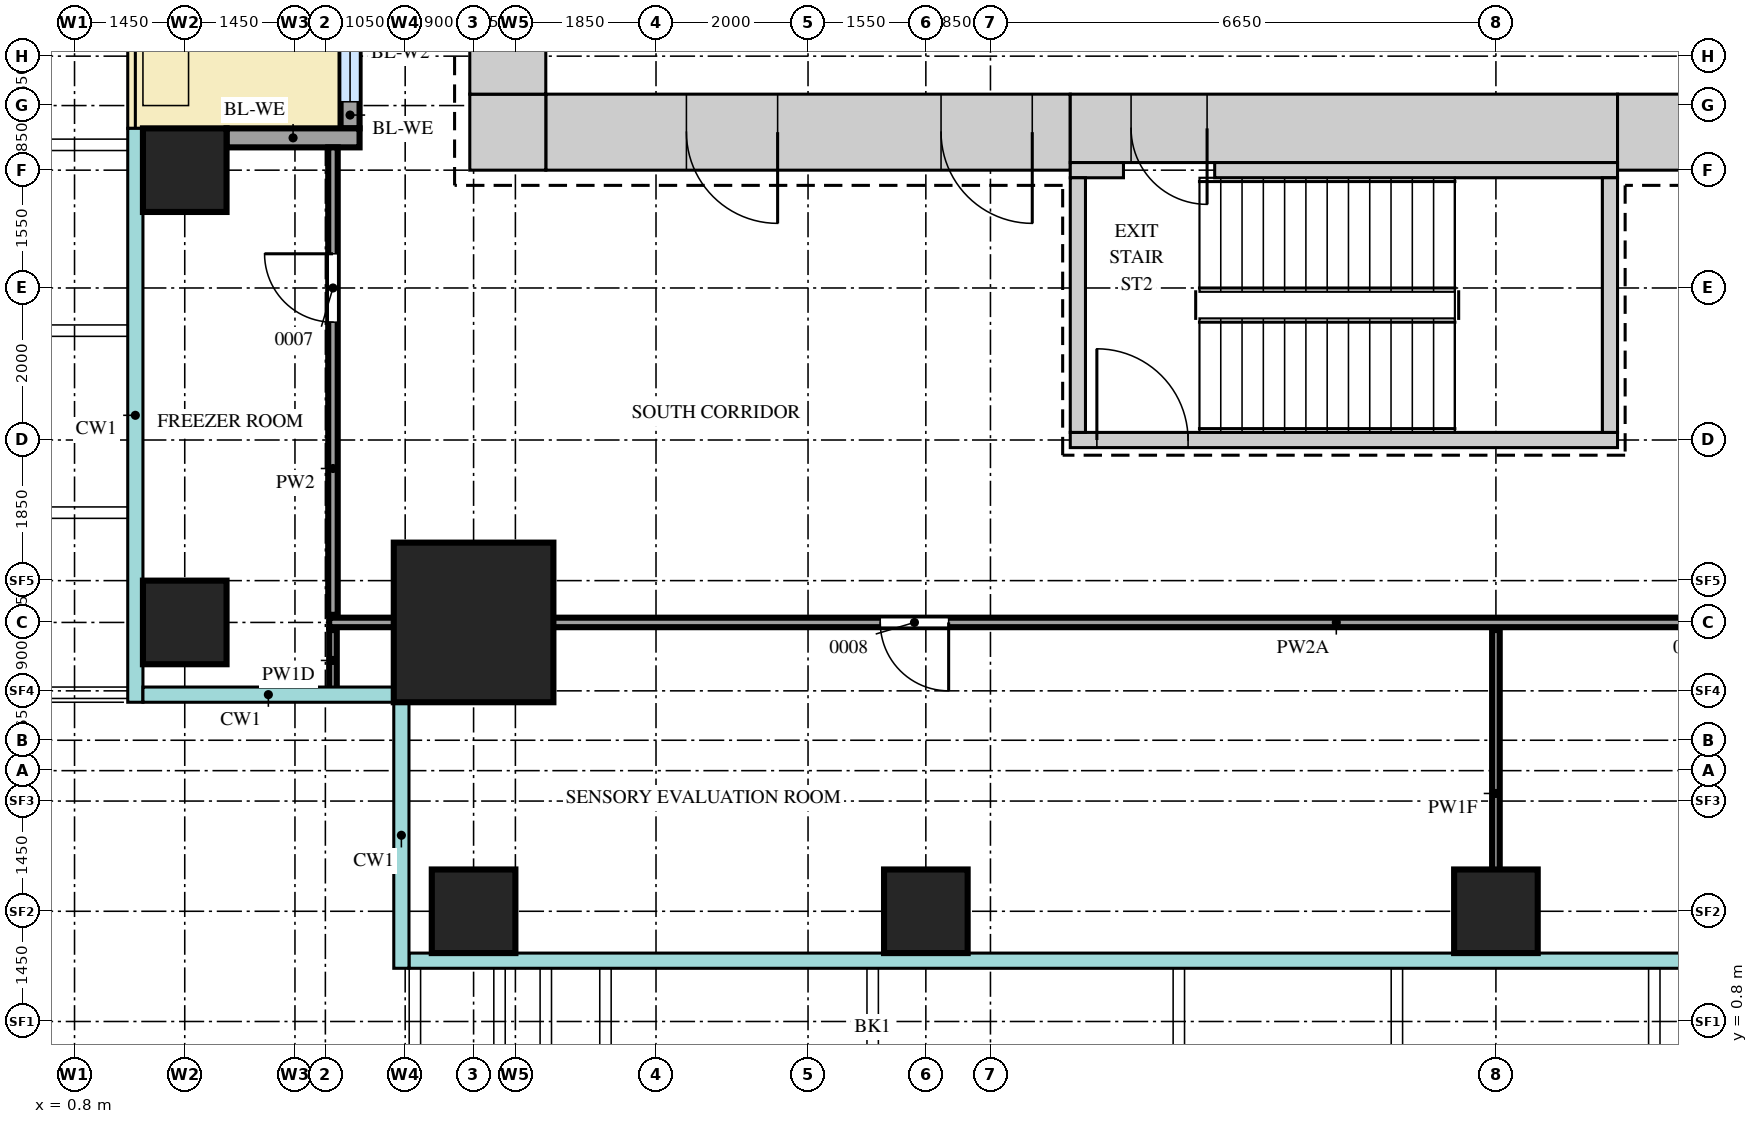
"""IFC4 building model, lengths in metres.
Left out: names, types, materials, properties, quantities, classifications, styles, units other than length and angle.
Written with IfcOpenShell. Run it as: python <this file> out.ifc"""

import sys

from ifc_helpers import new_model, si_unit, direction, frame, frame_2d, origin, origin_2d, place, context, subcontext, project, spatial, rectangle, extrude, source, transform, mapped, element, fill, save


model = new_model("IFC4")
c1 = context("Model", 3, precision=1e-05, world=origin(), true_north=direction((0.0, 1.0)))
c2 = subcontext(c1, "Body", "Model", "MODEL_VIEW")
j1 = project(units=[si_unit("LENGTHUNIT", "METRE"), si_unit("PLANEANGLEUNIT", "RADIAN")], contexts=[c1])
p1 = place(None, origin())
s1 = spatial("IfcSite", under=j1, at=p1, CompositionType="ELEMENT")
p2 = place(p1, origin())
s2 = spatial("IfcBuilding", under=s1, at=p2, CompositionType="ELEMENT")
p3 = place(p2, frame((0.0, 0.0, 114.7)))
s3 = spatial("IfcBuildingStorey", under=s2, at=p3, CompositionType="ELEMENT", Elevation=114.7)
m1 = source(origin(), c2, "Body", "SweptSolid", [
    extrude(rectangle(XDim=6.9, YDim=1.0, at=frame_2d((3.45, 0.0))), origin(), (0.0, 0.0, 1.0), 4.1),
])
p4 = place(p3, frame((7.0, 12.5, 0.0), z_axis=(0.0, 0.0, 1.0), x_axis=(1.0, 0.0, 0.0)))
e1 = element("IfcWall", 1, at=p4, inside=s3, PredefinedType="SHEAR", context=c2, shape_type="MappedRepresentation", body=[
    mapped(m1, transform((0.0, 0.0, 0.0))),
])
m2 = source(origin(), c2, "Body", "SweptSolid", [
    extrude(rectangle(XDim=1.2, YDim=2.1, at=frame_2d((0.6, 1.05))), frame((0.0, 0.51, 0.0), z_axis=(0.0, -1.0, 0.0), x_axis=(1.0, 0.0, 0.0)), (0.0, 0.0, 1.0), 1.02),
])
p5 = place(p4, frame((5.2, 0.0, 0.0)))
e2 = element("IfcOpeningElement", 2, at=p5, cuts=e1, PredefinedType="OPENING", context=c2, shape_type="MappedRepresentation", body=[
    mapped(m2, transform((0.0, 0.0, 0.0))),
])
p6 = place(p4, frame((1.85, 0.0, 0.0)))
e3 = element("IfcOpeningElement", 3, at=p6, cuts=e1, PredefinedType="OPENING", context=c2, shape_type="MappedRepresentation", body=[
    mapped(m2, transform((0.0, 0.0, 0.0))),
])
m3 = source(origin(), c2, "Body", "SweptSolid", [
    extrude(rectangle(XDim=7.2, YDim=0.9, at=frame_2d((3.6, 0.0))), origin(), (0.0, 0.0, 1.0), 4.1),
])
p7 = place(p3, frame((13.9, 12.55, 0.0), z_axis=(0.0, 0.0, 1.0), x_axis=(1.0, 0.0, 0.0)))
e4 = element("IfcWall", 4, at=p7, inside=s3, PredefinedType="SHEAR", context=c2, shape_type="MappedRepresentation", body=[
    mapped(m3, transform((0.0, 0.0, 0.0))),
])
m4 = source(origin(), c2, "Body", "SweptSolid", [
    extrude(rectangle(XDim=1.0, YDim=2.1, at=frame_2d((0.5, 1.05))), frame((0.0, 0.46, 0.0), z_axis=(0.0, -1.0, 0.0), x_axis=(1.0, 0.0, 0.0)), (0.0, 0.0, 1.0), 0.92),
])
p8 = place(p7, frame((0.8, 0.0, 0.0)))
e5 = element("IfcOpeningElement", 5, at=p8, cuts=e4, PredefinedType="OPENING", context=c2, shape_type="MappedRepresentation", body=[
    mapped(m4, transform((0.0, 0.0, 0.0))),
])
m5 = source(origin(), c2, "Body", "SweptSolid", [
    extrude(rectangle(XDim=1.9, YDim=1.0, at=frame_2d((0.95, 0.0))), origin(), (0.0, 0.0, 1.0), 4.1),
])
p9 = place(p3, frame((21.1, 12.5, 0.0), z_axis=(0.0, 0.0, 1.0), x_axis=(1.0, 0.0, 0.0)))
e6 = element("IfcWall", 6, at=p9, inside=s3, PredefinedType="SHEAR", context=c2, shape_type="MappedRepresentation", body=[
    mapped(m5, transform((0.0, 0.0, 0.0))),
])
m6 = source(origin(), c2, "Body", "SweptSolid", [
    extrude(rectangle(XDim=1.0, YDim=1.0, at=frame_2d((0.5, 0.0))), origin(), (0.0, 0.0, 1.0), 4.1),
])
p10 = place(p3, frame((6.0, 12.5, 0.0), z_axis=(0.0, 0.0, 1.0), x_axis=(1.0, 0.0, 0.0)))
e7 = element("IfcWall", 7, at=p10, inside=s3, PredefinedType="SHEAR", context=c2, shape_type="MappedRepresentation", body=[
    mapped(m6, transform((0.0, 0.0, 0.0))),
])
m7 = source(origin(), c2, "Body", "SweptSolid", [
    extrude(rectangle(XDim=28.0, YDim=1.0, at=frame_2d((14.0, 0.0))), origin(), (0.0, 0.0, 1.0), 4.1),
])
p11 = place(p3, frame((6.5, 13.0, 0.0), z_axis=(0.0, 0.0, 1.0), x_axis=(0.0, 1.0, 0.0)))
e8 = element("IfcWall", 8, at=p11, inside=s3, PredefinedType="SHEAR", context=c2, shape_type="MappedRepresentation", body=[
    mapped(m7, transform((0.0, 0.0, 0.0))),
])
m8 = source(origin(), c2, "Body", "SweptSolid", [
    extrude(rectangle(XDim=0.7, YDim=0.2, at=frame_2d((0.35, 0.0))), origin(), (0.0, 0.0, 1.0), 4.1),
])
p12 = place(p3, frame((13.9, 12.0, 0.0), z_axis=(0.0, 0.0, 1.0), x_axis=(1.0, 0.0, 0.0)))
e9 = element("IfcWall", 9, at=p12, inside=s3, PredefinedType="SHEAR", context=c2, shape_type="MappedRepresentation", body=[
    mapped(m8, transform((0.0, 0.0, 0.0))),
])
m9 = source(origin(), c2, "Body", "SweptSolid", [
    extrude(rectangle(XDim=5.3, YDim=0.2, at=frame_2d((2.65, 0.0))), origin(), (0.0, 0.0, 1.0), 4.1),
])
p13 = place(p3, frame((15.8, 12.0, 0.0), z_axis=(0.0, 0.0, 1.0), x_axis=(1.0, 0.0, 0.0)))
e10 = element("IfcWall", 10, at=p13, inside=s3, PredefinedType="SHEAR", context=c2, shape_type="MappedRepresentation", body=[
    mapped(m9, transform((0.0, 0.0, 0.0))),
])
m10 = source(origin(), c2, "Body", "SweptSolid", [
    extrude(rectangle(XDim=7.2, YDim=0.2, at=frame_2d((3.6, 0.0))), origin(), (0.0, 0.0, 1.0), 4.1),
])
p14 = place(p3, frame((13.9, 8.45, 0.0), z_axis=(0.0, 0.0, 1.0), x_axis=(1.0, 0.0, 0.0)))
e11 = element("IfcWall", 11, at=p14, inside=s3, PredefinedType="SHEAR", context=c2, shape_type="MappedRepresentation", body=[
    mapped(m10, transform((0.0, 0.0, 0.0))),
])
m11 = source(origin(), c2, "Body", "SweptSolid", [
    extrude(rectangle(XDim=1.2, YDim=2.1, at=frame_2d((0.6, 1.05))), frame((0.0, 0.11, 0.0), z_axis=(0.0, -1.0, 0.0), x_axis=(1.0, 0.0, 0.0)), (0.0, 0.0, 1.0), 0.22),
])
p15 = place(p14, frame((0.35, 0.0, 0.0)))
e12 = element("IfcOpeningElement", 12, at=p15, cuts=e11, PredefinedType="OPENING", context=c2, shape_type="MappedRepresentation", body=[
    mapped(m11, transform((0.0, 0.0, 0.0))),
])
m12 = source(origin(), c2, "Body", "SweptSolid", [
    extrude(rectangle(XDim=3.35, YDim=0.2, at=frame_2d((1.675, 0.0))), origin(), (0.0, 0.0, 1.0), 4.1),
])
for number, where, z_axis, x_axis in (
    (13, (21.0, 8.55, 0.0), (0.0, 0.0, 1.0), (0.0, 1.0, 0.0)),
    (14, (14.0, 8.55, 0.0), (0.0, 0.0, 1.0), (0.0, 1.0, 0.0)),
):
    element("IfcWall", number, at=place(p3, frame(where, z_axis=z_axis, x_axis=x_axis)), inside=s3, PredefinedType="SHEAR", context=c2, shape_type="MappedRepresentation", body=[
        mapped(m12, transform((0.0, 0.0, 0.0))),
    ])
m13 = source(origin(), c2, "Body", "SweptSolid", [
    extrude(rectangle(XDim=2.1, YDim=2.1, at=origin_2d()), origin(), (0.0, 0.0, 1.0), 4.4),
])
p16 = place(p3, frame((6.05, 6.05, 0.0), z_axis=(0.0, 0.0, 1.0), x_axis=(1.0, 0.0, 0.0)))
e15 = element("IfcColumn", 15, at=p16, inside=s3, PredefinedType="COLUMN", context=c2, shape_type="MappedRepresentation", body=[
    mapped(m13, transform((0.0, 0.0, 0.0))),
])
m14 = source(origin(), c2, "Body", "SweptSolid", [
    extrude(rectangle(XDim=1.1, YDim=1.1, at=origin_2d()), origin(), (0.0, 0.0, 1.0), 4.1),
])
for number, where, z_axis, x_axis in (
    (16, (6.05, 2.25, 0.0), (0.0, 0.0, 1.0), (1.0, 0.0, 0.0)),
    (17, (12.0, 2.25, 0.0), (0.0, 0.0, 1.0), (1.0, 0.0, 0.0)),
    (18, (19.5, 2.25, 0.0), (0.0, 0.0, 1.0), (1.0, 0.0, 0.0)),
    (19, (2.25, 6.05, 0.0), (0.0, 0.0, 1.0), (1.0, 0.0, 0.0)),
    (20, (2.25, 12.0, 0.0), (0.0, 0.0, 1.0), (1.0, 0.0, 0.0)),
):
    element("IfcColumn", number, at=place(p3, frame(where, z_axis=z_axis, x_axis=x_axis)), inside=s3, PredefinedType="COLUMN", context=c2, shape_type="MappedRepresentation", body=[
        mapped(m14, transform((0.0, 0.0, 0.0))),
    ])
m15 = source(origin(), c2, "Body", "SweptSolid", [
    extrude(rectangle(XDim=6.4, YDim=0.25, at=frame_2d((3.2, 0.0))), origin(), (0.0, 0.0, 1.0), 3.5),
])
p17 = place(p3, frame((4.425, 12.55, 0.0), z_axis=(0.0, 0.0, 1.0), x_axis=(0.0, 1.0, 0.0)))
e21 = element("IfcWall", 21, at=p17, inside=s3, PredefinedType="SOLIDWALL", context=c2, shape_type="MappedRepresentation", body=[
    mapped(m15, transform((0.0, 0.0, 0.0))),
])
m16 = source(origin(), c2, "Body", "SweptSolid", [
    extrude(rectangle(XDim=1.65, YDim=2.4, at=frame_2d((0.825, 1.2))), frame((0.0, 0.135, 0.0), z_axis=(0.0, -1.0, 0.0), x_axis=(1.0, 0.0, 0.0)), (0.0, 0.0, 1.0), 0.27),
])
p18 = place(p17, frame((0.35, 0.0, 0.0)))
e22 = element("IfcOpeningElement", 22, at=p18, cuts=e21, PredefinedType="OPENING", context=c2, shape_type="MappedRepresentation", body=[
    mapped(m16, transform((0.0, 0.0, 0.0))),
])
p19 = place(p17, frame((4.4, 0.0, 0.0)))
e23 = element("IfcOpeningElement", 23, at=p19, cuts=e21, PredefinedType="OPENING", context=c2, shape_type="MappedRepresentation", body=[
    mapped(m16, transform((0.0, 0.0, 0.0))),
])
m17 = source(origin(), c2, "Body", "SweptSolid", [
    extrude(rectangle(XDim=1.8, YDim=2.4, at=frame_2d((0.9, 1.2))), frame((0.0, 0.135, 0.0), z_axis=(0.0, -1.0, 0.0), x_axis=(1.0, 0.0, 0.0)), (0.0, 0.0, 1.0), 0.27),
])
p20 = place(p17, frame((2.3, 0.0, 0.0)))
e24 = element("IfcOpeningElement", 24, at=p20, cuts=e21, PredefinedType="OPENING", context=c2, shape_type="MappedRepresentation", body=[
    mapped(m17, transform((0.0, 0.0, 0.0))),
])
m18 = source(origin(), c2, "Body", "SweptSolid", [
    extrude(rectangle(XDim=1.75, YDim=0.25, at=frame_2d((0.875, 0.0))), origin(), (0.0, 0.0, 1.0), 3.5),
])
p21 = place(p3, frame((2.8, 12.425, 0.0), z_axis=(0.0, 0.0, 1.0), x_axis=(1.0, 0.0, 0.0)))
e25 = element("IfcWall", 25, at=p21, inside=s3, PredefinedType="SOLIDWALL", context=c2, shape_type="MappedRepresentation", body=[
    mapped(m18, transform((0.0, 0.0, 0.0))),
])
m19 = source(origin(), c2, "Body", "SweptSolid", [
    extrude(rectangle(XDim=4.3, YDim=0.1, at=frame_2d((2.15, 0.0))), origin(), (0.0, 0.0, 1.0), 3.77),
])
p22 = place(p3, frame((19.5, 1.65, 0.0), z_axis=(0.0, 0.0, 1.0), x_axis=(0.0, 1.0, 0.0)))
e26 = element("IfcWall", 26, at=p22, inside=s3, PredefinedType="PARTITIONING", context=c2, shape_type="MappedRepresentation", body=[
    mapped(m19, transform((0.0, 0.0, 0.0))),
])
m20 = source(origin(), c2, "Body", "SweptSolid", [
    extrude(rectangle(XDim=0.8, YDim=0.1, at=frame_2d((0.4, 0.0))), origin(), (0.0, 0.0, 1.0), 4.2),
])
p23 = place(p3, frame((4.2, 5.15, 0.0), z_axis=(0.0, 0.0, 1.0), x_axis=(0.0, 1.0, 0.0)))
e27 = element("IfcWall", 27, at=p23, inside=s3, PredefinedType="PARTITIONING", context=c2, shape_type="MappedRepresentation", body=[
    mapped(m20, transform((0.0, 0.0, 0.0))),
])
m21 = source(origin(), c2, "Body", "SweptSolid", [
    extrude(rectangle(XDim=22.3, YDim=0.125, at=frame_2d((11.15, 0.0))), origin(), (0.0, 0.0, 1.0), 3.55),
])
p24 = place(p3, frame((4.15, 6.05, 0.0), z_axis=(0.0, 0.0, 1.0), x_axis=(1.0, 0.0, 0.0)))
e28 = element("IfcWall", 28, at=p24, inside=s3, PredefinedType="PARTITIONING", context=c2, shape_type="MappedRepresentation", body=[
    mapped(m21, transform((0.0, 0.0, 0.0))),
])
m22 = source(origin(), c2, "Body", "SweptSolid", [
    extrude(rectangle(XDim=0.9, YDim=2.1, at=frame_2d((0.45, 1.05))), frame((0.0, 0.073, 0.0), z_axis=(0.0, -1.0, 0.0), x_axis=(1.0, 0.0, 0.0)), (0.0, 0.0, 1.0), 0.145),
])
p25 = place(p24, frame((7.25, 0.0, 0.0)))
e29 = element("IfcOpeningElement", 29, at=p25, cuts=e28, PredefinedType="OPENING", context=c2, shape_type="MappedRepresentation", body=[
    mapped(m22, transform((0.0, 0.0, 0.0))),
])
p26 = place(p24, frame((18.35, 0.0, 0.0)))
e30 = element("IfcOpeningElement", 30, at=p26, cuts=e28, PredefinedType="OPENING", context=c2, shape_type="MappedRepresentation", body=[
    mapped(m22, transform((0.0, 0.0, 0.0))),
])
m23 = source(origin(), c2, "Body", "SweptSolid", [
    extrude(rectangle(XDim=6.15, YDim=0.125, at=frame_2d((3.075, 0.0))), origin(), (0.0, 0.0, 1.0), 4.2),
])
p27 = place(p3, frame((4.2, 6.15, 0.0), z_axis=(0.0, 0.0, 1.0), x_axis=(0.0, 1.0, 0.0)))
e31 = element("IfcWall", 31, at=p27, inside=s3, PredefinedType="PARTITIONING", context=c2, shape_type="MappedRepresentation", body=[
    mapped(m23, transform((0.0, 0.0, 0.0))),
])
p28 = place(p27, frame((3.85, 0.0, 0.0)))
e32 = element("IfcOpeningElement", 32, at=p28, cuts=e31, PredefinedType="OPENING", context=c2, shape_type="MappedRepresentation", body=[
    mapped(m22, transform((0.0, 0.0, 0.0))),
])
m24 = source(origin(), c2, "Body", "SweptSolid", [
    extrude(rectangle(XDim=1.65, YDim=2.4, at=frame_2d((0.825, 1.2))), frame((0.0, 0.03, 0.0), z_axis=(0.0, -1.0, 0.0), x_axis=(1.0, 0.0, 0.0)), (0.0, 0.0, 1.0), 0.06),
])
p29 = place(p18, origin())
e33 = element("IfcWindow", 33, at=p29, inside=s3, PartitioningType="SINGLE_PANEL", PredefinedType="WINDOW", context=c2, shape_type="MappedRepresentation", body=[
    mapped(m24, transform((0.0, 0.0, 0.0))),
])
fill(e22, e33)
m25 = source(origin(), c2, "Body", "SweptSolid", [
    extrude(rectangle(XDim=1.2, YDim=2.1, at=frame_2d((0.6, 1.05))), frame((0.0, 0.45, 0.0), z_axis=(0.0, -1.0, 0.0), x_axis=(1.0, 0.0, 0.0)), (0.0, 0.0, 1.0), 0.9),
])
p30 = place(p5, origin())
e34 = element("IfcDoor", 34, at=p30, inside=s3, OperationType="SINGLE_SWING_RIGHT", PredefinedType="DOOR", context=c2, shape_type="MappedRepresentation", body=[
    mapped(m25, transform((0.0, 0.0, 0.0))),
])
fill(e2, e34)
p31 = place(p6, origin())
e35 = element("IfcDoor", 35, at=p31, inside=s3, OperationType="SINGLE_SWING_RIGHT", PredefinedType="DOOR", context=c2, shape_type="MappedRepresentation", body=[
    mapped(m25, transform((0.0, 0.0, 0.0))),
])
fill(e3, e35)
m26 = source(origin(), c2, "Body", "SweptSolid", [
    extrude(rectangle(XDim=1.0, YDim=2.1, at=frame_2d((0.5, 1.05))), frame((0.0, 0.4, 0.0), z_axis=(0.0, -1.0, 0.0), x_axis=(1.0, 0.0, 0.0)), (0.0, 0.0, 1.0), 0.8),
])
p32 = place(p8, origin())
e36 = element("IfcDoor", 36, at=p32, inside=s3, OperationType="SINGLE_SWING_RIGHT", PredefinedType="DOOR", context=c2, shape_type="MappedRepresentation", body=[
    mapped(m26, transform((0.0, 0.0, 0.0))),
])
fill(e5, e36)
m27 = source(origin(), c2, "Body", "SweptSolid", [
    extrude(rectangle(XDim=0.9, YDim=2.1, at=frame_2d((0.45, 1.05))), frame((0.0, 0.025, 0.0), z_axis=(0.0, -1.0, 0.0), x_axis=(1.0, 0.0, 0.0)), (0.0, 0.0, 1.0), 0.05),
])
p33 = place(p25, origin())
e37 = element("IfcDoor", 37, at=p33, inside=s3, OperationType="SINGLE_SWING_RIGHT", PredefinedType="DOOR", context=c2, shape_type="MappedRepresentation", body=[
    mapped(m27, transform((0.0, 0.0, 0.0))),
])
fill(e29, e37)
p34 = place(p28, origin())
e38 = element("IfcDoor", 38, at=p34, inside=s3, OperationType="SINGLE_SWING_LEFT", PredefinedType="DOOR", context=c2, shape_type="MappedRepresentation", body=[
    mapped(m27, transform((0.0, 0.0, 0.0))),
])
fill(e32, e38)
m28 = source(origin(), c2, "Body", "SweptSolid", [
    extrude(rectangle(XDim=1.2, YDim=2.1, at=frame_2d((0.6, 1.05))), frame((0.0, 0.025, 0.0), z_axis=(0.0, -1.0, 0.0), x_axis=(1.0, 0.0, 0.0)), (0.0, 0.0, 1.0), 0.05),
])
p35 = place(p15, origin())
e39 = element("IfcDoor", 39, at=p35, inside=s3, OperationType="SINGLE_SWING_RIGHT", PredefinedType="DOOR", context=c2, shape_type="MappedRepresentation", body=[
    mapped(m28, transform((0.0, 0.0, 0.0))),
])
fill(e12, e39)
save(model, sys.argv[1])
